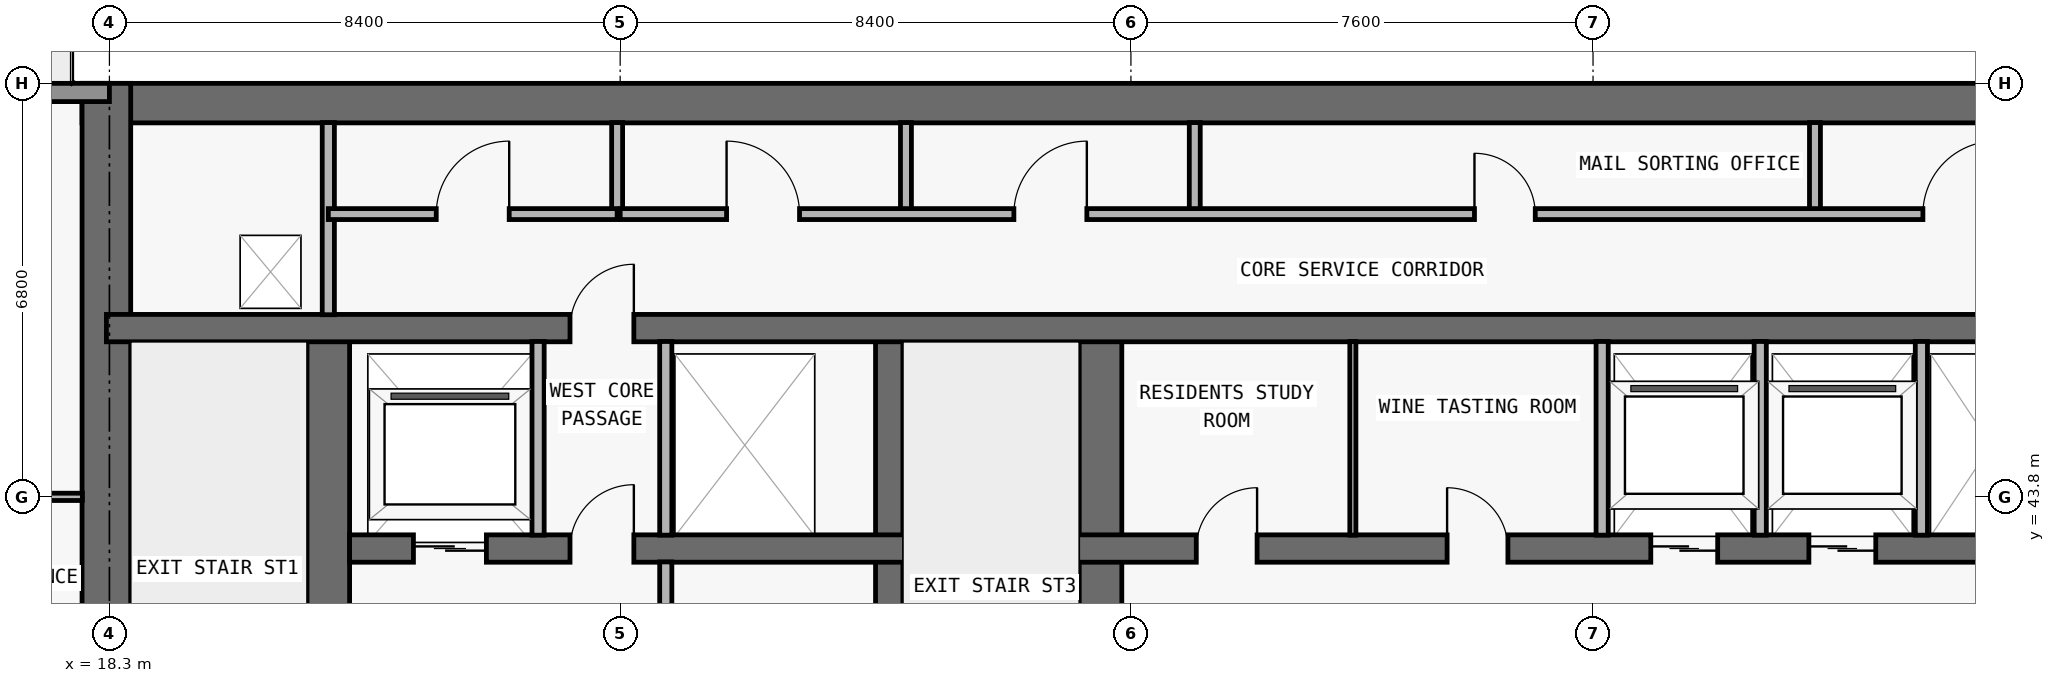
"""IFC4 building model, lengths in metres.
Left out: names, types, materials, properties, quantities, classifications, styles, units other than length and angle.
Written with IfcOpenShell. Run it as: python <this file> out.ifc"""

import sys

from ifc_helpers import new_model, si_unit, direction, frame, frame_2d, origin, place, context, subcontext, project, spatial, rectangle, extrude, element, fill, save


model = new_model("IFC4")
c1 = context("Model", 3, precision=1e-05, world=origin(), true_north=direction((0.0, 1.0)))
c2 = subcontext(c1, "Body", "Model", "MODEL_VIEW")
j1 = project(units=[si_unit("LENGTHUNIT", "METRE"), si_unit("PLANEANGLEUNIT", "RADIAN")], contexts=[c1])
p1 = place(None, origin())
s1 = spatial("IfcSite", under=j1, at=p1, CompositionType="ELEMENT")
p2 = place(p1, origin())
s2 = spatial("IfcBuilding", under=s1, at=p2, CompositionType="ELEMENT")
p3 = place(p2, frame((0.0, 0.0, 105.9)))
s3 = spatial("IfcBuildingStorey", under=s2, at=p3, CompositionType="ELEMENT", Elevation=105.9)
p4 = place(p3, frame((17.85, 50.275, 0.0), z_axis=(0.0, 0.0, 1.0), x_axis=(1.0, 0.0, 0.0)))
e1 = element("IfcWall", 1, at=p4, inside=s3, PredefinedType="SHEAR", context=c2, shape_type="SweptSolid", body=[
    extrude(rectangle(XDim=42.1, YDim=0.65, at=frame_2d((21.05, 0.0))), origin(), (0.0, 0.0, 1.0), 3.05),
])
p5 = place(p3, frame((18.25, 36.55, 0.0), z_axis=(0.0, 0.0, 1.0), x_axis=(0.0, 1.0, 0.0)))
e2 = element("IfcWall", 2, at=p5, inside=s3, PredefinedType="SHEAR", context=c2, shape_type="SweptSolid", body=[
    extrude(rectangle(XDim=14.05, YDim=0.8, at=frame_2d((7.025, 0.0))), origin(), (0.0, 0.0, 1.0), 3.05),
])
p6 = place(p3, frame((21.9, 36.95, 0.0), z_axis=(0.0, 0.0, 1.0), x_axis=(0.0, 1.0, 0.0)))
e3 = element("IfcWall", 3, at=p6, inside=s3, PredefinedType="SHEAR", context=c2, shape_type="SweptSolid", body=[
    extrude(rectangle(XDim=9.625, YDim=0.7, at=frame_2d((4.812, 0.0))), origin(), (0.0, 0.0, 1.0), 3.05),
])
p7 = place(p6, frame((0.6, 0.0, 0.0)))
e4 = element("IfcOpeningElement", 4, at=p7, cuts=e3, PredefinedType="OPENING", context=c2, shape_type="SweptSolid", body=[
    extrude(rectangle(XDim=1.1, YDim=2.15, at=frame_2d((0.55, 1.075))), frame((0.0, 0.36, 0.0), z_axis=(0.0, -1.0, 0.0), x_axis=(1.0, 0.0, 0.0)), (0.0, 0.0, 1.0), 0.72),
])
p8 = place(p3, frame((31.125, 36.95, 0.0), z_axis=(0.0, 0.0, 1.0), x_axis=(0.0, 1.0, 0.0)))
e5 = element("IfcWall", 5, at=p8, inside=s3, PredefinedType="SHEAR", context=c2, shape_type="SweptSolid", body=[
    extrude(rectangle(XDim=9.625, YDim=0.45, at=frame_2d((4.812, 0.0))), origin(), (0.0, 0.0, 1.0), 3.05),
])
p9 = place(p3, frame((34.6, 36.95, 0.0), z_axis=(0.0, 0.0, 1.0), x_axis=(0.0, 1.0, 0.0)))
e6 = element("IfcWall", 6, at=p9, inside=s3, PredefinedType="SHEAR", context=c2, shape_type="SweptSolid", body=[
    extrude(rectangle(XDim=9.625, YDim=0.7, at=frame_2d((4.812, 0.0))), origin(), (0.0, 0.0, 1.0), 3.05),
])
p10 = place(p3, frame((22.25, 42.95, 0.0), z_axis=(0.0, 0.0, 1.0), x_axis=(1.0, 0.0, 0.0)))
e7 = element("IfcWall", 7, at=p10, inside=s3, PredefinedType="SHEAR", context=c2, shape_type="SweptSolid", body=[
    extrude(rectangle(XDim=33.3, YDim=0.45, at=frame_2d((16.65, 0.0))), origin(), (0.0, 0.0, 1.0), 3.05),
])
p11 = place(p10, frame((1.05, 0.0, 0.0)))
e8 = element("IfcOpeningElement", 8, at=p11, cuts=e7, PredefinedType="OPENING", context=c2, shape_type="SweptSolid", body=[
    extrude(rectangle(XDim=1.2, YDim=2.2, at=frame_2d((0.6, 1.1))), frame((0.0, 0.235, 0.0), z_axis=(0.0, -1.0, 0.0), x_axis=(1.0, 0.0, 0.0)), (0.0, 0.0, 1.0), 0.47),
])
p12 = place(p10, frame((31.05, 0.0, 0.0)))
e9 = element("IfcOpeningElement", 9, at=p12, cuts=e7, PredefinedType="OPENING", context=c2, shape_type="SweptSolid", body=[
    extrude(rectangle(XDim=1.2, YDim=2.2, at=frame_2d((0.6, 1.1))), frame((0.0, 0.235, 0.0), z_axis=(0.0, -1.0, 0.0), x_axis=(1.0, 0.0, 0.0)), (0.0, 0.0, 1.0), 0.47),
])
p13 = place(p10, frame((21.4, 0.0, 0.0)))
e10 = element("IfcOpeningElement", 10, at=p13, cuts=e7, PredefinedType="OPENING", context=c2, shape_type="SweptSolid", body=[
    extrude(rectangle(XDim=1.1, YDim=2.2, at=frame_2d((0.55, 1.1))), frame((0.0, 0.235, 0.0), z_axis=(0.0, -1.0, 0.0), x_axis=(1.0, 0.0, 0.0)), (0.0, 0.0, 1.0), 0.47),
])
p14 = place(p10, frame((24.0, 0.0, 0.0)))
e11 = element("IfcOpeningElement", 11, at=p14, cuts=e7, PredefinedType="OPENING", context=c2, shape_type="SweptSolid", body=[
    extrude(rectangle(XDim=1.1, YDim=2.2, at=frame_2d((0.55, 1.1))), frame((0.0, 0.235, 0.0), z_axis=(0.0, -1.0, 0.0), x_axis=(1.0, 0.0, 0.0)), (0.0, 0.0, 1.0), 0.47),
])
p15 = place(p10, frame((3.625, 0.0, 0.0)))
e12 = element("IfcOpeningElement", 12, at=p15, cuts=e7, PredefinedType="OPENING", context=c2, shape_type="SweptSolid", body=[
    extrude(rectangle(XDim=1.05, YDim=2.15, at=frame_2d((0.525, 1.075))), frame((0.0, 0.235, 0.0), z_axis=(0.0, -1.0, 0.0), x_axis=(1.0, 0.0, 0.0)), (0.0, 0.0, 1.0), 0.47),
])
p16 = place(p10, frame((28.675, 0.0, 0.0)))
e13 = element("IfcOpeningElement", 13, at=p16, cuts=e7, PredefinedType="OPENING", context=c2, shape_type="SweptSolid", body=[
    extrude(rectangle(XDim=1.05, YDim=2.15, at=frame_2d((0.525, 1.075))), frame((0.0, 0.235, 0.0), z_axis=(0.0, -1.0, 0.0), x_axis=(1.0, 0.0, 0.0)), (0.0, 0.0, 1.0), 0.47),
])
p17 = place(p10, frame((13.925, 0.0, 0.0)))
e14 = element("IfcOpeningElement", 14, at=p17, cuts=e7, PredefinedType="OPENING", context=c2, shape_type="SweptSolid", body=[
    extrude(rectangle(XDim=1.0, YDim=2.2, at=frame_2d((0.5, 1.1))), frame((0.0, 0.235, 0.0), z_axis=(0.0, -1.0, 0.0), x_axis=(1.0, 0.0, 0.0)), (0.0, 0.0, 1.0), 0.47),
])
p18 = place(p10, frame((18.05, 0.0, 0.0)))
e15 = element("IfcOpeningElement", 15, at=p18, cuts=e7, PredefinedType="OPENING", context=c2, shape_type="SweptSolid", body=[
    extrude(rectangle(XDim=1.0, YDim=2.2, at=frame_2d((0.5, 1.1))), frame((0.0, 0.235, 0.0), z_axis=(0.0, -1.0, 0.0), x_axis=(1.0, 0.0, 0.0)), (0.0, 0.0, 1.0), 0.47),
])
p19 = place(p3, frame((18.25, 46.575, 0.0), z_axis=(0.0, 0.0, 1.0), x_axis=(1.0, 0.0, 0.0)))
e16 = element("IfcWall", 16, at=p19, inside=s3, PredefinedType="SHEAR", context=c2, shape_type="SweptSolid", body=[
    extrude(rectangle(XDim=41.3, YDim=0.45, at=frame_2d((20.65, 0.0))), origin(), (0.0, 0.0, 1.0), 3.05),
])
p20 = place(p19, frame((7.625, 0.0, 0.0)))
e17 = element("IfcOpeningElement", 17, at=p20, cuts=e16, PredefinedType="OPENING", context=c2, shape_type="SweptSolid", body=[
    extrude(rectangle(XDim=1.05, YDim=2.15, at=frame_2d((0.525, 1.075))), frame((0.0, 0.235, 0.0), z_axis=(0.0, -1.0, 0.0), x_axis=(1.0, 0.0, 0.0)), (0.0, 0.0, 1.0), 0.47),
])
p21 = place(p19, frame((32.675, 0.0, 0.0)))
e18 = element("IfcOpeningElement", 18, at=p21, cuts=e16, PredefinedType="OPENING", context=c2, shape_type="SweptSolid", body=[
    extrude(rectangle(XDim=1.05, YDim=2.15, at=frame_2d((0.525, 1.075))), frame((0.0, 0.235, 0.0), z_axis=(0.0, -1.0, 0.0), x_axis=(1.0, 0.0, 0.0)), (0.0, 0.0, 1.0), 0.47),
])
p22 = place(p3, frame((7.7, 50.45, 0.0), z_axis=(0.0, 0.0, 1.0), x_axis=(1.0, 0.0, 0.0)))
e19 = element("IfcWall", 19, at=p22, inside=s3, PredefinedType="STANDARD", context=c2, shape_type="SweptSolid", body=[
    extrude(rectangle(XDim=10.6, YDim=0.3, at=frame_2d((5.3, 0.0))), origin(), (0.0, 0.0, 1.0), 3.05),
])
p23 = place(p22, frame((4.3, 0.0, 0.0)))
e20 = element("IfcOpeningElement", 20, at=p23, cuts=e19, PredefinedType="OPENING", context=c2, shape_type="SweptSolid", body=[
    extrude(rectangle(XDim=2.0, YDim=2.3, at=frame_2d((1.0, 1.15))), frame((0.0, 0.16, 0.0), z_axis=(0.0, -1.0, 0.0), x_axis=(1.0, 0.0, 0.0)), (0.0, 0.0, 1.0), 0.32),
])
p24 = place(p3, frame((21.9, 46.795, 0.0), z_axis=(0.0, 0.0, 1.0), x_axis=(0.0, 1.0, 0.0)))
e21 = element("IfcWall", 21, at=p24, inside=s3, PredefinedType="PARTITIONING", context=c2, shape_type="SweptSolid", body=[
    extrude(rectangle(XDim=3.16, YDim=0.2, at=frame_2d((1.58, 0.0))), origin(), (0.0, 0.0, 1.0), 3.05),
])
p25 = place(p3, frame((25.35, 43.17, 0.0), z_axis=(0.0, 0.0, 1.0), x_axis=(0.0, 1.0, 0.0)))
e22 = element("IfcWall", 22, at=p25, inside=s3, PredefinedType="PARTITIONING", context=c2, shape_type="SweptSolid", body=[
    extrude(rectangle(XDim=3.185, YDim=0.2, at=frame_2d((1.593, 0.0))), origin(), (0.0, 0.0, 1.0), 3.05),
])
p26 = place(p3, frame((26.65, 48.45, 0.0), z_axis=(0.0, 0.0, 1.0), x_axis=(0.0, 1.0, 0.0)))
e23 = element("IfcWall", 23, at=p26, inside=s3, PredefinedType="PARTITIONING", context=c2, shape_type="SweptSolid", body=[
    extrude(rectangle(XDim=1.505, YDim=0.18, at=frame_2d((0.752, 0.0))), origin(), (0.0, 0.0, 1.0), 3.05),
])
p27 = place(p3, frame((27.45, 37.345, 0.0), z_axis=(0.0, 0.0, 1.0), x_axis=(0.0, 1.0, 0.0)))
e24 = element("IfcWall", 24, at=p27, inside=s3, PredefinedType="PARTITIONING", context=c2, shape_type="SweptSolid", body=[
    extrude(rectangle(XDim=5.385, YDim=0.2, at=frame_2d((2.692, 0.0))), origin(), (0.0, 0.0, 1.0), 3.05),
])
p28 = place(p3, frame((27.45, 43.17, 0.0), z_axis=(0.0, 0.0, 1.0), x_axis=(0.0, 1.0, 0.0)))
e25 = element("IfcWall", 25, at=p28, inside=s3, PredefinedType="PARTITIONING", context=c2, shape_type="SweptSolid", body=[
    extrude(rectangle(XDim=3.185, YDim=0.2, at=frame_2d((1.593, 0.0))), origin(), (0.0, 0.0, 1.0), 3.05),
])
for number, where, z_axis, x_axis in (
    (26, (31.4, 48.45, 0.0), (0.0, 0.0, 1.0), (0.0, 1.0, 0.0)),
    (27, (36.15, 48.45, 0.0), (0.0, 0.0, 1.0), (0.0, 1.0, 0.0)),
):
    element("IfcWall", number, at=place(p3, frame(where, z_axis=z_axis, x_axis=x_axis)), inside=s3, PredefinedType="PARTITIONING", context=c2, shape_type="SweptSolid", body=[
        extrude(rectangle(XDim=1.505, YDim=0.18, at=frame_2d((0.752, 0.0))), origin(), (0.0, 0.0, 1.0), 3.05),
    ])
p29 = place(p3, frame((38.75, 43.17, 0.0), z_axis=(0.0, 0.0, 1.0), x_axis=(0.0, 1.0, 0.0)))
e28 = element("IfcWall", 28, at=p29, inside=s3, PredefinedType="MOVABLE", context=c2, shape_type="SweptSolid", body=[
    extrude(rectangle(XDim=3.185, YDim=0.1, at=frame_2d((1.593, 0.0))), origin(), (0.0, 0.0, 1.0), 3.05),
])
for number, where, z_axis, x_axis in (
    (29, (42.85, 43.17, 0.0), (0.0, 0.0, 1.0), (0.0, 1.0, 0.0)),
    (30, (45.45, 43.17, 0.0), (0.0, 0.0, 1.0), (0.0, 1.0, 0.0)),
):
    element("IfcWall", number, at=place(p3, frame(where, z_axis=z_axis, x_axis=x_axis)), inside=s3, PredefinedType="PARTITIONING", context=c2, shape_type="SweptSolid", body=[
        extrude(rectangle(XDim=3.185, YDim=0.2, at=frame_2d((1.593, 0.0))), origin(), (0.0, 0.0, 1.0), 3.05),
    ])
p30 = place(p3, frame((46.35, 48.45, 0.0), z_axis=(0.0, 0.0, 1.0), x_axis=(0.0, 1.0, 0.0)))
e31 = element("IfcWall", 31, at=p30, inside=s3, PredefinedType="PARTITIONING", context=c2, shape_type="SweptSolid", body=[
    extrude(rectangle(XDim=1.505, YDim=0.18, at=frame_2d((0.752, 0.0))), origin(), (0.0, 0.0, 1.0), 3.05),
])
p31 = place(p3, frame((48.1, 43.17, 0.0), z_axis=(0.0, 0.0, 1.0), x_axis=(0.0, 1.0, 0.0)))
e32 = element("IfcWall", 32, at=p31, inside=s3, PredefinedType="PARTITIONING", context=c2, shape_type="SweptSolid", body=[
    extrude(rectangle(XDim=3.185, YDim=0.2, at=frame_2d((1.593, 0.0))), origin(), (0.0, 0.0, 1.0), 3.05),
])
p32 = place(p3, frame((4.195, 43.8, 0.0), z_axis=(0.0, 0.0, 1.0), x_axis=(1.0, 0.0, 0.0)))
e33 = element("IfcWall", 33, at=p32, inside=s3, PredefinedType="PARTITIONING", context=c2, shape_type="SweptSolid", body=[
    extrude(rectangle(XDim=13.66, YDim=0.12, at=frame_2d((6.83, 0.0))), origin(), (0.0, 0.0, 1.0), 2.339),
])
p33 = place(p32, frame((8.743, 0.0, 0.0)))
e34 = element("IfcOpeningElement", 34, at=p33, cuts=e33, PredefinedType="OPENING", context=c2, shape_type="SweptSolid", body=[
    extrude(rectangle(XDim=0.9, YDim=2.15, at=frame_2d((0.45, 1.075))), frame((0.0, 0.07, 0.0), z_axis=(0.0, -1.0, 0.0), x_axis=(1.0, 0.0, 0.0)), (0.0, 0.0, 1.0), 0.14),
])
p34 = place(p32, frame((12.107, 0.0, 0.0)))
e35 = element("IfcOpeningElement", 35, at=p34, cuts=e33, PredefinedType="OPENING", context=c2, shape_type="SweptSolid", body=[
    extrude(rectangle(XDim=0.85, YDim=2.1, at=frame_2d((0.425, 1.05))), frame((0.0, 0.07, 0.0), z_axis=(0.0, -1.0, 0.0), x_axis=(1.0, 0.0, 0.0)), (0.0, 0.0, 1.0), 0.14),
])
p35 = place(p3, frame((21.9, 48.45, 0.0), z_axis=(0.0, 0.0, 1.0), x_axis=(1.0, 0.0, 0.0)))
e36 = element("IfcWall", 36, at=p35, inside=s3, PredefinedType="PARTITIONING", context=c2, shape_type="SweptSolid", body=[
    extrude(rectangle(XDim=4.75, YDim=0.18, at=frame_2d((2.375, 0.0))), origin(), (0.0, 0.0, 1.0), 3.05),
])
p36 = place(p35, frame((1.775, 0.0, 0.0)))
e37 = element("IfcOpeningElement", 37, at=p36, cuts=e36, PredefinedType="OPENING", context=c2, shape_type="SweptSolid", body=[
    extrude(rectangle(XDim=1.2, YDim=2.2, at=frame_2d((0.6, 1.1))), frame((0.0, 0.1, 0.0), z_axis=(0.0, -1.0, 0.0), x_axis=(1.0, 0.0, 0.0)), (0.0, 0.0, 1.0), 0.2),
])
p37 = place(p3, frame((26.7, 48.45, 0.0), z_axis=(0.0, 0.0, 1.0), x_axis=(1.0, 0.0, 0.0)))
e38 = element("IfcWall", 38, at=p37, inside=s3, PredefinedType="PARTITIONING", context=c2, shape_type="SweptSolid", body=[
    extrude(rectangle(XDim=29.2, YDim=0.18, at=frame_2d((14.6, 0.0))), origin(), (0.0, 0.0, 1.0), 3.05),
])
p38 = place(p37, frame((1.75, 0.0, 0.0)))
e39 = element("IfcOpeningElement", 39, at=p38, cuts=e38, PredefinedType="OPENING", context=c2, shape_type="SweptSolid", body=[
    extrude(rectangle(XDim=1.2, YDim=2.2, at=frame_2d((0.6, 1.1))), frame((0.0, 0.1, 0.0), z_axis=(0.0, -1.0, 0.0), x_axis=(1.0, 0.0, 0.0)), (0.0, 0.0, 1.0), 0.2),
])
p39 = place(p37, frame((6.475, 0.0, 0.0)))
e40 = element("IfcOpeningElement", 40, at=p39, cuts=e38, PredefinedType="OPENING", context=c2, shape_type="SweptSolid", body=[
    extrude(rectangle(XDim=1.2, YDim=2.2, at=frame_2d((0.6, 1.1))), frame((0.0, 0.1, 0.0), z_axis=(0.0, -1.0, 0.0), x_axis=(1.0, 0.0, 0.0)), (0.0, 0.0, 1.0), 0.2),
])
p40 = place(p37, frame((14.05, 0.0, 0.0)))
e41 = element("IfcOpeningElement", 41, at=p40, cuts=e38, PredefinedType="OPENING", context=c2, shape_type="SweptSolid", body=[
    extrude(rectangle(XDim=1.0, YDim=2.2, at=frame_2d((0.5, 1.1))), frame((0.0, 0.1, 0.0), z_axis=(0.0, -1.0, 0.0), x_axis=(1.0, 0.0, 0.0)), (0.0, 0.0, 1.0), 0.2),
])
p41 = place(p37, frame((21.425, 0.0, 0.0)))
e42 = element("IfcOpeningElement", 42, at=p41, cuts=e38, PredefinedType="OPENING", context=c2, shape_type="SweptSolid", body=[
    extrude(rectangle(XDim=1.2, YDim=2.2, at=frame_2d((0.6, 1.1))), frame((0.0, 0.1, 0.0), z_axis=(0.0, -1.0, 0.0), x_axis=(1.0, 0.0, 0.0)), (0.0, 0.0, 1.0), 0.2),
])
p42 = place(p37, frame((26.375, 0.0, 0.0)))
e43 = element("IfcOpeningElement", 43, at=p42, cuts=e38, PredefinedType="OPENING", context=c2, shape_type="SweptSolid", body=[
    extrude(rectangle(XDim=0.85, YDim=2.1, at=frame_2d((0.425, 1.05))), frame((0.0, 0.1, 0.0), z_axis=(0.0, -1.0, 0.0), x_axis=(1.0, 0.0, 0.0)), (0.0, 0.0, 1.0), 0.2),
])
p43 = place(p11, origin())
e44 = element("IfcDoor", 44, at=p43, inside=s3, OperationType="DOUBLE_DOOR_SLIDING", PredefinedType="DOOR", context=c2, shape_type="SweptSolid", body=[
    extrude(rectangle(XDim=1.2, YDim=2.2, at=frame_2d((0.6, 1.1))), frame((0.0, 0.025, 0.0), z_axis=(0.0, -1.0, 0.0), x_axis=(1.0, 0.0, 0.0)), (0.0, 0.0, 1.0), 0.05),
])
fill(e8, e44)
p44 = place(p13, origin())
e45 = element("IfcDoor", 45, at=p44, inside=s3, OperationType="DOUBLE_DOOR_SLIDING", PredefinedType="DOOR", context=c2, shape_type="SweptSolid", body=[
    extrude(rectangle(XDim=1.1, YDim=2.2, at=frame_2d((0.55, 1.1))), frame((0.0, 0.025, 0.0), z_axis=(0.0, -1.0, 0.0), x_axis=(1.0, 0.0, 0.0)), (0.0, 0.0, 1.0), 0.05),
])
fill(e10, e45)
p45 = place(p14, origin())
e46 = element("IfcDoor", 46, at=p45, inside=s3, OperationType="DOUBLE_DOOR_SLIDING", PredefinedType="DOOR", context=c2, shape_type="SweptSolid", body=[
    extrude(rectangle(XDim=1.1, YDim=2.2, at=frame_2d((0.55, 1.1))), frame((0.0, 0.025, 0.0), z_axis=(0.0, -1.0, 0.0), x_axis=(1.0, 0.0, 0.0)), (0.0, 0.0, 1.0), 0.05),
])
fill(e11, e46)
p46 = place(p15, origin())
e47 = element("IfcDoor", 47, at=p46, inside=s3, OperationType="SINGLE_SWING_RIGHT", PredefinedType="DOOR", context=c2, shape_type="SweptSolid", body=[
    extrude(rectangle(XDim=1.05, YDim=2.15, at=frame_2d((0.525, 1.075))), frame((0.0, 0.025, 0.0), z_axis=(0.0, -1.0, 0.0), x_axis=(1.0, 0.0, 0.0)), (0.0, 0.0, 1.0), 0.05),
])
fill(e12, e47)
p47 = place(p17, origin())
e48 = element("IfcDoor", 48, at=p47, inside=s3, OperationType="SINGLE_SWING_RIGHT", PredefinedType="DOOR", context=c2, shape_type="SweptSolid", body=[
    extrude(rectangle(XDim=1.0, YDim=2.2, at=frame_2d((0.5, 1.1))), frame((0.0, 0.025, 0.0), z_axis=(0.0, -1.0, 0.0), x_axis=(1.0, 0.0, 0.0)), (0.0, 0.0, 1.0), 0.05),
])
fill(e14, e48)
p48 = place(p18, origin())
e49 = element("IfcDoor", 49, at=p48, inside=s3, OperationType="SINGLE_SWING_LEFT", PredefinedType="DOOR", context=c2, shape_type="SweptSolid", body=[
    extrude(rectangle(XDim=1.0, YDim=2.2, at=frame_2d((0.5, 1.1))), frame((0.0, 0.025, 0.0), z_axis=(0.0, -1.0, 0.0), x_axis=(1.0, 0.0, 0.0)), (0.0, 0.0, 1.0), 0.05),
])
fill(e15, e49)
p49 = place(p20, origin())
e50 = element("IfcDoor", 50, at=p49, inside=s3, OperationType="SINGLE_SWING_RIGHT", PredefinedType="DOOR", context=c2, shape_type="SweptSolid", body=[
    extrude(rectangle(XDim=1.05, YDim=2.15, at=frame_2d((0.525, 1.075))), frame((0.0, 0.025, 0.0), z_axis=(0.0, -1.0, 0.0), x_axis=(1.0, 0.0, 0.0)), (0.0, 0.0, 1.0), 0.05),
])
fill(e17, e50)
p50 = place(p36, origin())
e51 = element("IfcDoor", 51, at=p50, inside=s3, OperationType="SINGLE_SWING_RIGHT", PredefinedType="DOOR", context=c2, shape_type="SweptSolid", body=[
    extrude(rectangle(XDim=1.2, YDim=2.2, at=frame_2d((0.6, 1.1))), frame((0.0, 0.025, 0.0), z_axis=(0.0, -1.0, 0.0), x_axis=(1.0, 0.0, 0.0)), (0.0, 0.0, 1.0), 0.05),
])
fill(e37, e51)
p51 = place(p38, origin())
e52 = element("IfcDoor", 52, at=p51, inside=s3, OperationType="SINGLE_SWING_LEFT", PredefinedType="DOOR", context=c2, shape_type="SweptSolid", body=[
    extrude(rectangle(XDim=1.2, YDim=2.2, at=frame_2d((0.6, 1.1))), frame((0.0, 0.025, 0.0), z_axis=(0.0, -1.0, 0.0), x_axis=(1.0, 0.0, 0.0)), (0.0, 0.0, 1.0), 0.05),
])
fill(e39, e52)
p52 = place(p39, origin())
e53 = element("IfcDoor", 53, at=p52, inside=s3, OperationType="SINGLE_SWING_RIGHT", PredefinedType="DOOR", context=c2, shape_type="SweptSolid", body=[
    extrude(rectangle(XDim=1.2, YDim=2.2, at=frame_2d((0.6, 1.1))), frame((0.0, 0.025, 0.0), z_axis=(0.0, -1.0, 0.0), x_axis=(1.0, 0.0, 0.0)), (0.0, 0.0, 1.0), 0.05),
])
fill(e40, e53)
p53 = place(p40, origin())
e54 = element("IfcDoor", 54, at=p53, inside=s3, OperationType="SINGLE_SWING_LEFT", PredefinedType="DOOR", context=c2, shape_type="SweptSolid", body=[
    extrude(rectangle(XDim=1.0, YDim=2.2, at=frame_2d((0.5, 1.1))), frame((0.0, 0.025, 0.0), z_axis=(0.0, -1.0, 0.0), x_axis=(1.0, 0.0, 0.0)), (0.0, 0.0, 1.0), 0.05),
])
fill(e41, e54)
p54 = place(p41, origin())
e55 = element("IfcDoor", 55, at=p54, inside=s3, OperationType="SINGLE_SWING_RIGHT", PredefinedType="DOOR", context=c2, shape_type="SweptSolid", body=[
    extrude(rectangle(XDim=1.2, YDim=2.2, at=frame_2d((0.6, 1.1))), frame((0.0, 0.025, 0.0), z_axis=(0.0, -1.0, 0.0), x_axis=(1.0, 0.0, 0.0)), (0.0, 0.0, 1.0), 0.05),
])
fill(e42, e55)
save(model, sys.argv[1])
